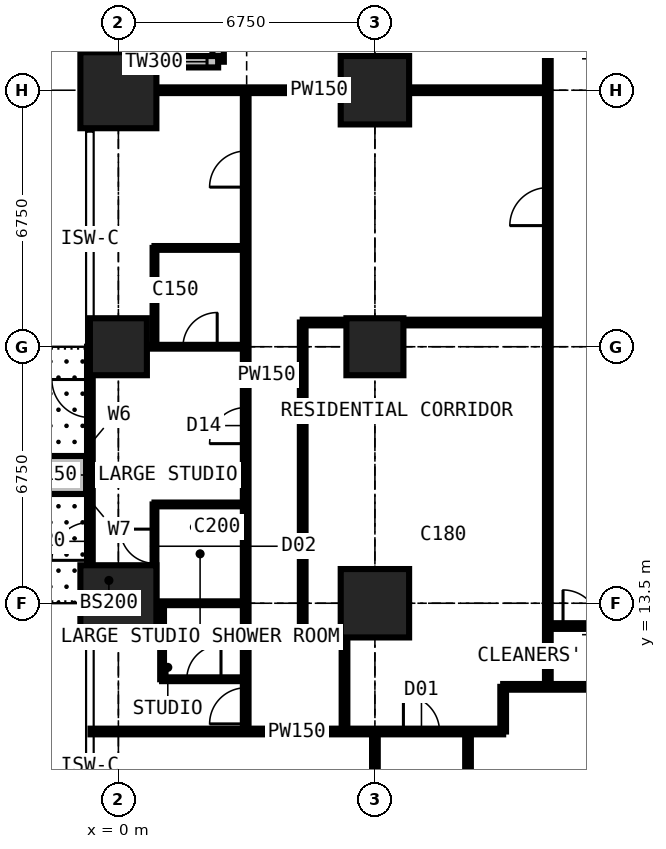
"""IFC4 building model, lengths in metres.
Left out: names, types, materials, properties, quantities, classifications, styles, units other than length and angle.
Written with IfcOpenShell. Run it as: python <this file> out.ifc"""

import sys

from ifc_helpers import new_model, si_unit, direction, frame, frame_2d, origin, origin_2d, place, context, subcontext, project, spatial, rectangle, extrude, element, fill, save


model = new_model("IFC4")
c1 = context("Model", 3, precision=1e-05, world=origin(), true_north=direction((0.0, 1.0)))
c2 = subcontext(c1, "Body", "Model", "MODEL_VIEW")
j1 = project(units=[si_unit("LENGTHUNIT", "METRE"), si_unit("PLANEANGLEUNIT", "RADIAN")], contexts=[c1])
p1 = place(None, origin())
s1 = spatial("IfcSite", under=j1, at=p1, CompositionType="ELEMENT")
p2 = place(p1, origin())
s2 = spatial("IfcBuilding", under=s1, at=p2, CompositionType="ELEMENT")
p3 = place(p2, frame((0.0, 0.0, 142.2)))
s3 = spatial("IfcBuildingStorey", under=s2, at=p3, CompositionType="ELEMENT", Elevation=142.2)
p4 = place(p3, frame((0.0, 13.5, 0.0), z_axis=(0.0, 0.0, 1.0), x_axis=(1.0, 0.0, 0.0)))
e1 = element("IfcColumn", 1, at=p4, inside=s3, PredefinedType="COLUMN", context=c2, shape_type="SweptSolid", body=[
    extrude(rectangle(XDim=2.0, YDim=2.0, at=origin_2d()), origin(), (0.0, 0.0, 1.0), 3.6),
])
p5 = place(p3, frame((0.0, 20.25, 0.0), z_axis=(0.0, 0.0, 1.0), x_axis=(1.0, 0.0, 0.0)))
e2 = element("IfcColumn", 2, at=p5, inside=s3, PredefinedType="COLUMN", context=c2, shape_type="SweptSolid", body=[
    extrude(rectangle(XDim=1.5, YDim=1.5, at=origin_2d()), origin(), (0.0, 0.0, 1.0), 3.6),
])
p6 = place(p3, frame((0.0, 27.0, 0.0), z_axis=(0.0, 0.0, 1.0), x_axis=(1.0, 0.0, 0.0)))
e3 = element("IfcColumn", 3, at=p6, inside=s3, PredefinedType="COLUMN", context=c2, shape_type="SweptSolid", body=[
    extrude(rectangle(XDim=2.0, YDim=2.0, at=origin_2d()), origin(), (0.0, 0.0, 1.0), 3.6),
])
p7 = place(p3, frame((6.75, 13.5, 0.0), z_axis=(0.0, 0.0, 1.0), x_axis=(1.0, 0.0, 0.0)))
e4 = element("IfcColumn", 4, at=p7, inside=s3, PredefinedType="COLUMN", context=c2, shape_type="SweptSolid", body=[
    extrude(rectangle(XDim=1.8, YDim=1.8, at=origin_2d()), origin(), (0.0, 0.0, 1.0), 3.6),
])
p8 = place(p3, frame((6.75, 20.25, 0.0), z_axis=(0.0, 0.0, 1.0), x_axis=(1.0, 0.0, 0.0)))
e5 = element("IfcColumn", 5, at=p8, inside=s3, PredefinedType="COLUMN", context=c2, shape_type="SweptSolid", body=[
    extrude(rectangle(XDim=1.5, YDim=1.5, at=origin_2d()), origin(), (0.0, 0.0, 1.0), 3.6),
])
p9 = place(p3, frame((6.75, 27.0, 0.0), z_axis=(0.0, 0.0, 1.0), x_axis=(1.0, 0.0, 0.0)))
e6 = element("IfcColumn", 6, at=p9, inside=s3, PredefinedType="COLUMN", context=c2, shape_type="SweptSolid", body=[
    extrude(rectangle(XDim=1.8, YDim=1.8, at=origin_2d()), origin(), (0.0, 0.0, 1.0), 3.6),
])
p10 = place(p3, frame((2.625, 31.125, 0.0), z_axis=(0.0, 0.0, 1.0), x_axis=(0.0, -1.0, 0.0)))
e7 = element("IfcWall", 7, at=p10, inside=s3, PredefinedType="SOLIDWALL", context=c2, shape_type="SweptSolid", body=[
    extrude(rectangle(XDim=3.375, YDim=0.3, at=frame_2d((1.688, 0.0))), origin(), (0.0, 0.0, 1.0), 3.375),
])
p11 = place(p10, frame((0.788, 0.0, 0.6)))
e8 = element("IfcOpeningElement", 8, at=p11, cuts=e7, PredefinedType="OPENING", context=c2, shape_type="SweptSolid", body=[
    extrude(rectangle(XDim=1.8, YDim=2.1, at=frame_2d((0.9, 1.05))), frame((0.0, 0.16, 0.0), z_axis=(0.0, -1.0, 0.0), x_axis=(1.0, 0.0, 0.0)), (0.0, 0.0, 1.0), 0.32),
])
p12 = place(p3, frame((2.625, 27.75, 0.0), z_axis=(0.0, 0.0, 1.0), x_axis=(-1.0, 0.0, 0.0)))
e9 = element("IfcWall", 9, at=p12, inside=s3, PredefinedType="SOLIDWALL", context=c2, shape_type="SweptSolid", body=[
    extrude(rectangle(XDim=3.375, YDim=0.3, at=frame_2d((1.688, 0.0))), origin(), (0.0, 0.0, 1.0), 3.375),
])
p13 = place(p12, frame((0.292, 0.0, 0.9)))
e10 = element("IfcOpeningElement", 10, at=p13, cuts=e9, PredefinedType="OPENING", context=c2, shape_type="SweptSolid", body=[
    extrude(rectangle(XDim=1.2, YDim=1.8, at=frame_2d((0.6, 0.9))), frame((0.0, 0.16, 0.0), z_axis=(0.0, -1.0, 0.0), x_axis=(1.0, 0.0, 0.0)), (0.0, 0.0, 1.0), 0.32),
])
p14 = place(p3, frame((-0.75, 13.5, 0.0), z_axis=(0.0, 0.0, 1.0), x_axis=(0.0, 1.0, 0.0)))
e11 = element("IfcWall", 11, at=p14, inside=s3, PredefinedType="SOLIDWALL", context=c2, shape_type="SweptSolid", body=[
    extrude(rectangle(XDim=6.75, YDim=0.15, at=frame_2d((3.375, 0.0))), origin(), (0.0, 0.0, 1.0), 3.375),
])
p15 = place(p14, frame((1.129, 0.0, 0.0)))
e12 = element("IfcOpeningElement", 12, at=p15, cuts=e11, PredefinedType="OPENING", context=c2, shape_type="SweptSolid", body=[
    extrude(rectangle(XDim=1.0, YDim=2.2, at=frame_2d((0.5, 1.1))), frame((0.0, 0.085, 0.0), z_axis=(0.0, -1.0, 0.0), x_axis=(1.0, 0.0, 0.0)), (0.0, 0.0, 1.0), 0.17),
])
p16 = place(p14, frame((2.258, 0.0, 0.9)))
e13 = element("IfcOpeningElement", 13, at=p16, cuts=e11, PredefinedType="OPENING", context=c2, shape_type="SweptSolid", body=[
    extrude(rectangle(XDim=0.9, YDim=1.8, at=frame_2d((0.45, 0.9))), frame((0.0, 0.085, 0.0), z_axis=(0.0, -1.0, 0.0), x_axis=(1.0, 0.0, 0.0)), (0.0, 0.0, 1.0), 0.17),
])
p17 = place(p14, frame((4.887, 0.0, 0.0)))
e14 = element("IfcOpeningElement", 14, at=p17, cuts=e11, PredefinedType="OPENING", context=c2, shape_type="SweptSolid", body=[
    extrude(rectangle(XDim=1.0, YDim=2.2, at=frame_2d((0.5, 1.1))), frame((0.0, 0.085, 0.0), z_axis=(0.0, -1.0, 0.0), x_axis=(1.0, 0.0, 0.0)), (0.0, 0.0, 1.0), 0.17),
])
p18 = place(p14, frame((3.575, 0.0, 0.9)))
e15 = element("IfcOpeningElement", 15, at=p18, cuts=e11, PredefinedType="OPENING", context=c2, shape_type="SweptSolid", body=[
    extrude(rectangle(XDim=1.2, YDim=1.8, at=frame_2d((0.6, 0.9))), frame((0.0, 0.085, 0.0), z_axis=(0.0, -1.0, 0.0), x_axis=(1.0, 0.0, 0.0)), (0.0, 0.0, 1.0), 0.17),
])
p19 = place(p3, frame((-0.85, 16.875, 0.0), z_axis=(0.0, 0.0, 1.0), x_axis=(-1.0, 0.0, 0.0)))
e16 = element("IfcWall", 16, at=p19, inside=s3, PredefinedType="USERDEFINED", context=c2, shape_type="SweptSolid", body=[
    extrude(rectangle(XDim=2.2, YDim=1.0, at=frame_2d((1.1, 0.0))), origin(), (0.0, 0.0, 1.0), 0.9),
])
p20 = place(p3, frame((-0.734, 10.125, 0.0), z_axis=(0.0, 0.0, 1.0), x_axis=(1.0, 0.0, 0.0)))
e17 = element("IfcWall", 17, at=p20, inside=s3, PredefinedType="PARTITIONING", context=c2, shape_type="SweptSolid", body=[
    extrude(rectangle(XDim=10.859, YDim=0.15, at=frame_2d((5.429, 0.0))), origin(), (0.0, 0.0, 1.0), 3.375),
])
p21 = place(p20, frame((8.234, 0.0, 0.0)))
e18 = element("IfcOpeningElement", 18, at=p21, cuts=e17, PredefinedType="OPENING", context=c2, shape_type="SweptSolid", body=[
    extrude(rectangle(XDim=0.95, YDim=2.2, at=frame_2d((0.475, 1.1))), frame((0.0, 0.085, 0.0), z_axis=(0.0, -1.0, 0.0), x_axis=(1.0, 0.0, 0.0)), (0.0, 0.0, 1.0), 0.17),
])
p22 = place(p3, frame((-0.734, 13.5, 0.0), z_axis=(0.0, 0.0, 1.0), x_axis=(1.0, 0.0, 0.0)))
e19 = element("IfcWall", 19, at=p22, inside=s3, PredefinedType="PARTITIONING", context=c2, shape_type="SweptSolid", body=[
    extrude(rectangle(XDim=4.084, YDim=0.1, at=frame_2d((2.042, 0.0))), origin(), (0.0, 0.0, 1.0), 2.877),
])
p23 = place(p3, frame((-0.734, 20.25, 0.0), z_axis=(0.0, 0.0, 1.0), x_axis=(1.0, 0.0, 0.0)))
e20 = element("IfcWall", 20, at=p23, inside=s3, PredefinedType="PARTITIONING", context=c2, shape_type="SweptSolid", body=[
    extrude(rectangle(XDim=4.084, YDim=0.1, at=frame_2d((2.042, 0.0))), origin(), (0.0, 0.0, 1.0), 2.877),
])
p24 = place(p23, frame((2.434, 0.0, 0.0)))
e21 = element("IfcOpeningElement", 21, at=p24, cuts=e20, PredefinedType="OPENING", context=c2, shape_type="SweptSolid", body=[
    extrude(rectangle(XDim=0.9, YDim=2.2, at=frame_2d((0.45, 1.1))), frame((0.0, 0.06, 0.0), z_axis=(0.0, -1.0, 0.0), x_axis=(1.0, 0.0, 0.0)), (0.0, 0.0, 1.0), 0.12),
])
p25 = place(p3, frame((-0.734, 27.0, 0.0), z_axis=(0.0, 0.0, 1.0), x_axis=(1.0, 0.0, 0.0)))
e22 = element("IfcWall", 22, at=p25, inside=s3, PredefinedType="PARTITIONING", context=c2, shape_type="SweptSolid", body=[
    extrude(rectangle(XDim=12.034, YDim=0.15, at=frame_2d((6.017, 0.0))), origin(), (0.0, 0.0, 1.0), 2.806),
])
p26 = place(p3, frame((0.95, 13.5, 0.0), z_axis=(0.0, 0.0, 1.0), x_axis=(0.0, 1.0, 0.0)))
e23 = element("IfcWall", 23, at=p26, inside=s3, PredefinedType="PARTITIONING", context=c2, shape_type="SweptSolid", body=[
    extrude(rectangle(XDim=2.6, YDim=0.1, at=frame_2d((1.3, 0.0))), origin(), (0.0, 0.0, 1.0), 3.375),
])
p27 = place(p26, frame((1.05, 0.0, 0.0)))
e24 = element("IfcOpeningElement", 24, at=p27, cuts=e23, PredefinedType="OPENING", context=c2, shape_type="SweptSolid", body=[
    extrude(rectangle(XDim=0.9, YDim=2.2, at=frame_2d((0.45, 1.1))), frame((0.0, 0.06, 0.0), z_axis=(0.0, -1.0, 0.0), x_axis=(1.0, 0.0, 0.0)), (0.0, 0.0, 1.0), 0.12),
])
p28 = place(p3, frame((0.95, 16.1, 0.0), z_axis=(0.0, 0.0, 1.0), x_axis=(1.0, 0.0, 0.0)))
e25 = element("IfcWall", 25, at=p28, inside=s3, PredefinedType="PARTITIONING", context=c2, shape_type="SweptSolid", body=[
    extrude(rectangle(XDim=2.4, YDim=0.1, at=frame_2d((1.2, 0.0))), origin(), (0.0, 0.0, 1.0), 3.375),
])
p29 = place(p3, frame((0.95, 20.25, 0.0), z_axis=(0.0, 0.0, 1.0), x_axis=(0.0, 1.0, 0.0)))
e26 = element("IfcWall", 26, at=p29, inside=s3, PredefinedType="PARTITIONING", context=c2, shape_type="SweptSolid", body=[
    extrude(rectangle(XDim=2.6, YDim=0.1, at=frame_2d((1.3, 0.0))), origin(), (0.0, 0.0, 1.0), 3.375),
])
p30 = place(p3, frame((0.95, 22.85, 0.0), z_axis=(0.0, 0.0, 1.0), x_axis=(1.0, 0.0, 0.0)))
e27 = element("IfcWall", 27, at=p30, inside=s3, PredefinedType="PARTITIONING", context=c2, shape_type="SweptSolid", body=[
    extrude(rectangle(XDim=2.4, YDim=0.1, at=frame_2d((1.2, 0.0))), origin(), (0.0, 0.0, 1.0), 3.375),
])
p31 = place(p3, frame((1.15, 11.5, 0.0), z_axis=(0.0, 0.0, 1.0), x_axis=(0.0, 1.0, 0.0)))
e28 = element("IfcWall", 28, at=p31, inside=s3, PredefinedType="PARTITIONING", context=c2, shape_type="SweptSolid", body=[
    extrude(rectangle(XDim=2.0, YDim=0.1, at=frame_2d((1.0, 0.0))), origin(), (0.0, 0.0, 1.0), 3.375),
])
p32 = place(p3, frame((1.15, 11.5, 0.0), z_axis=(0.0, 0.0, 1.0), x_axis=(1.0, 0.0, 0.0)))
e29 = element("IfcWall", 29, at=p32, inside=s3, PredefinedType="PARTITIONING", context=c2, shape_type="SweptSolid", body=[
    extrude(rectangle(XDim=2.2, YDim=0.1, at=frame_2d((1.1, 0.0))), origin(), (0.0, 0.0, 1.0), 3.375),
])
p33 = place(p32, frame((0.65, 0.0, 0.0)))
e30 = element("IfcOpeningElement", 30, at=p33, cuts=e29, PredefinedType="OPENING", context=c2, shape_type="SweptSolid", body=[
    extrude(rectangle(XDim=0.9, YDim=2.2, at=frame_2d((0.45, 1.1))), frame((0.0, 0.06, 0.0), z_axis=(0.0, -1.0, 0.0), x_axis=(1.0, 0.0, 0.0)), (0.0, 0.0, 1.0), 0.12),
])
p34 = place(p3, frame((3.35, 10.125, 0.0), z_axis=(0.0, 0.0, 1.0), x_axis=(0.0, 1.0, 0.0)))
e31 = element("IfcWall", 31, at=p34, inside=s3, PredefinedType="PARTITIONING", context=c2, shape_type="SweptSolid", body=[
    extrude(rectangle(XDim=16.875, YDim=0.15, at=frame_2d((8.438, 0.0))), origin(), (0.0, 0.0, 1.0), 3.375),
])
p35 = place(p34, frame((7.575, 0.0, 0.0)))
e32 = element("IfcOpeningElement", 32, at=p35, cuts=e31, PredefinedType="OPENING", context=c2, shape_type="SweptSolid", body=[
    extrude(rectangle(XDim=0.95, YDim=2.2, at=frame_2d((0.475, 1.1))), frame((0.0, 0.085, 0.0), z_axis=(0.0, -1.0, 0.0), x_axis=(1.0, 0.0, 0.0)), (0.0, 0.0, 1.0), 0.17),
])
p36 = place(p34, frame((14.325, 0.0, 0.0)))
e33 = element("IfcOpeningElement", 33, at=p36, cuts=e31, PredefinedType="OPENING", context=c2, shape_type="SweptSolid", body=[
    extrude(rectangle(XDim=0.95, YDim=2.2, at=frame_2d((0.475, 1.1))), frame((0.0, 0.085, 0.0), z_axis=(0.0, -1.0, 0.0), x_axis=(1.0, 0.0, 0.0)), (0.0, 0.0, 1.0), 0.17),
])
p37 = place(p34, frame((0.2, 0.0, 0.0)))
e34 = element("IfcOpeningElement", 34, at=p37, cuts=e31, PredefinedType="OPENING", context=c2, shape_type="SweptSolid", body=[
    extrude(rectangle(XDim=0.95, YDim=2.2, at=frame_2d((0.475, 1.1))), frame((0.0, 0.085, 0.0), z_axis=(0.0, -1.0, 0.0), x_axis=(1.0, 0.0, 0.0)), (0.0, 0.0, 1.0), 0.17),
])
p38 = place(p3, frame((4.85, 12.775, 0.0), z_axis=(0.0, 0.0, 1.0), x_axis=(0.0, 1.0, 0.0)))
e35 = element("IfcWall", 35, at=p38, inside=s3, PredefinedType="PARTITIONING", context=c2, shape_type="SweptSolid", body=[
    extrude(rectangle(XDim=8.113, YDim=0.15, at=frame_2d((4.056, 0.0))), origin(), (0.0, 0.0, 1.0), 3.375),
])
p39 = place(p3, frame((4.85, 12.775, 0.0), z_axis=(0.0, 0.0, 1.0), x_axis=(1.0, 0.0, 0.0)))
e36 = element("IfcWall", 36, at=p39, inside=s3, PredefinedType="PARTITIONING", context=c2, shape_type="SweptSolid", body=[
    extrude(rectangle(XDim=1.1, YDim=0.15, at=frame_2d((0.55, 0.0))), origin(), (0.0, 0.0, 1.0), 3.375),
])
p40 = place(p3, frame((4.85, 20.887, 0.0), z_axis=(0.0, 0.0, 1.0), x_axis=(1.0, 0.0, 0.0)))
e37 = element("IfcWall", 37, at=p40, inside=s3, PredefinedType="PARTITIONING", context=c2, shape_type="SweptSolid", body=[
    extrude(rectangle(XDim=6.45, YDim=0.15, at=frame_2d((3.225, 0.0))), origin(), (0.0, 0.0, 1.0), 3.375),
])
p41 = place(p3, frame((5.95, 10.125, 0.0), z_axis=(0.0, 0.0, 1.0), x_axis=(0.0, 1.0, 0.0)))
e38 = element("IfcWall", 38, at=p41, inside=s3, PredefinedType="PARTITIONING", context=c2, shape_type="SweptSolid", body=[
    extrude(rectangle(XDim=2.65, YDim=0.15, at=frame_2d((1.325, 0.0))), origin(), (0.0, 0.0, 1.0), 3.375),
])
p42 = place(p3, frame((6.75, -0.734, 0.0), z_axis=(0.0, 0.0, 1.0), x_axis=(0.0, 1.0, 0.0)))
e39 = element("IfcWall", 39, at=p42, inside=s3, PredefinedType="PARTITIONING", context=c2, shape_type="SweptSolid", body=[
    extrude(rectangle(XDim=10.859, YDim=0.15, at=frame_2d((5.429, 0.0))), origin(), (0.0, 0.0, 1.0), 2.877),
])
p43 = place(p42, frame((5.684, 0.0, 0.0)))
e40 = element("IfcOpeningElement", 40, at=p43, cuts=e39, PredefinedType="OPENING", context=c2, shape_type="SweptSolid", body=[
    extrude(rectangle(XDim=1.0, YDim=2.2, at=frame_2d((0.5, 1.1))), frame((0.0, 0.085, 0.0), z_axis=(0.0, -1.0, 0.0), x_axis=(1.0, 0.0, 0.0)), (0.0, 0.0, 1.0), 0.17),
])
p44 = place(p3, frame((9.2, 4.85, 0.0), z_axis=(0.0, 0.0, 1.0), x_axis=(0.0, 1.0, 0.0)))
e41 = element("IfcWall", 41, at=p44, inside=s3, PredefinedType="PARTITIONING", context=c2, shape_type="SweptSolid", body=[
    extrude(rectangle(XDim=5.275, YDim=0.15, at=frame_2d((2.637, 0.0))), origin(), (0.0, 0.0, 1.0), 3.375),
])
p45 = place(p3, frame((10.125, 10.125, 0.0), z_axis=(0.0, 0.0, 1.0), x_axis=(0.0, 1.0, 0.0)))
e42 = element("IfcWall", 42, at=p45, inside=s3, PredefinedType="PARTITIONING", context=c2, shape_type="SweptSolid", body=[
    extrude(rectangle(XDim=1.175, YDim=0.15, at=frame_2d((0.587, 0.0))), origin(), (0.0, 0.0, 1.0), 3.375),
])
p46 = place(p3, frame((10.125, 11.3, 0.0), z_axis=(0.0, 0.0, 1.0), x_axis=(1.0, 0.0, 0.0)))
e43 = element("IfcWall", 43, at=p46, inside=s3, PredefinedType="PARTITIONING", context=c2, shape_type="SweptSolid", body=[
    extrude(rectangle(XDim=20.25, YDim=0.15, at=frame_2d((10.125, 0.0))), origin(), (0.0, 0.0, 1.0), 3.375),
])
p47 = place(p46, frame((11.312, 0.0, 0.0)))
e44 = element("IfcOpeningElement", 44, at=p47, cuts=e43, PredefinedType="OPENING", context=c2, shape_type="SweptSolid", body=[
    extrude(rectangle(XDim=1.0, YDim=2.2, at=frame_2d((0.5, 1.1))), frame((0.0, 0.085, 0.0), z_axis=(0.0, -1.0, 0.0), x_axis=(1.0, 0.0, 0.0)), (0.0, 0.0, 1.0), 0.17),
])
p48 = place(p3, frame((11.3, 11.3, 0.0), z_axis=(0.0, 0.0, 1.0), x_axis=(0.0, 1.0, 0.0)))
e45 = element("IfcWall", 45, at=p48, inside=s3, PredefinedType="PARTITIONING", context=c2, shape_type="SweptSolid", body=[
    extrude(rectangle(XDim=19.3, YDim=0.15, at=frame_2d((9.65, 0.0))), origin(), (0.0, 0.0, 1.0), 3.375),
])
p49 = place(p48, frame((18.1, 0.0, 0.0)))
e46 = element("IfcOpeningElement", 46, at=p49, cuts=e45, PredefinedType="OPENING", context=c2, shape_type="SweptSolid", body=[
    extrude(rectangle(XDim=1.0, YDim=2.2, at=frame_2d((0.5, 1.1))), frame((0.0, 0.085, 0.0), z_axis=(0.0, -1.0, 0.0), x_axis=(1.0, 0.0, 0.0)), (0.0, 0.0, 1.0), 0.17),
])
p50 = place(p48, frame((12.137, 0.0, 0.0)))
e47 = element("IfcOpeningElement", 47, at=p50, cuts=e45, PredefinedType="OPENING", context=c2, shape_type="SweptSolid", body=[
    extrude(rectangle(XDim=1.0, YDim=2.2, at=frame_2d((0.5, 1.1))), frame((0.0, 0.085, 0.0), z_axis=(0.0, -1.0, 0.0), x_axis=(1.0, 0.0, 0.0)), (0.0, 0.0, 1.0), 0.17),
])
p51 = place(p3, frame((11.3, 12.9, 0.0), z_axis=(0.0, 0.0, 1.0), x_axis=(1.0, 0.0, 0.0)))
e48 = element("IfcWall", 48, at=p51, inside=s3, PredefinedType="PARTITIONING", context=c2, shape_type="SweptSolid", body=[
    extrude(rectangle(XDim=1.8, YDim=0.15, at=frame_2d((0.9, 0.0))), origin(), (0.0, 0.0, 1.0), 2.806),
])
p52 = place(p51, frame((0.4, 0.0, 0.0)))
e49 = element("IfcOpeningElement", 49, at=p52, cuts=e48, PredefinedType="OPENING", context=c2, shape_type="SweptSolid", body=[
    extrude(rectangle(XDim=0.95, YDim=2.2, at=frame_2d((0.475, 1.1))), frame((0.0, 0.085, 0.0), z_axis=(0.0, -1.0, 0.0), x_axis=(1.0, 0.0, 0.0)), (0.0, 0.0, 1.0), 0.17),
])
p53 = place(p13, origin())
e50 = element("IfcWindow", 50, at=p53, inside=s3, PartitioningType="SINGLE_PANEL", PredefinedType="WINDOW", context=c2, shape_type="SweptSolid", body=[
    extrude(rectangle(XDim=1.2, YDim=1.8, at=frame_2d((0.6, 0.9))), frame((0.0, 0.03, 0.0), z_axis=(0.0, -1.0, 0.0), x_axis=(1.0, 0.0, 0.0)), (0.0, 0.0, 1.0), 0.06),
])
fill(e10, e50)
p54 = place(p15, origin())
e51 = element("IfcDoor", 51, at=p54, inside=s3, OperationType="SINGLE_SWING_LEFT", PredefinedType="DOOR", context=c2, shape_type="SweptSolid", body=[
    extrude(rectangle(XDim=1.0, YDim=2.2, at=frame_2d((0.5, 1.1))), frame((0.0, 0.025, 0.0), z_axis=(0.0, -1.0, 0.0), x_axis=(1.0, 0.0, 0.0)), (0.0, 0.0, 1.0), 0.05),
])
fill(e12, e51)
p55 = place(p16, origin())
e52 = element("IfcWindow", 52, at=p55, inside=s3, PartitioningType="SINGLE_PANEL", PredefinedType="WINDOW", context=c2, shape_type="SweptSolid", body=[
    extrude(rectangle(XDim=0.9, YDim=1.8, at=frame_2d((0.45, 0.9))), frame((0.0, 0.03, 0.0), z_axis=(0.0, -1.0, 0.0), x_axis=(1.0, 0.0, 0.0)), (0.0, 0.0, 1.0), 0.06),
])
fill(e13, e52)
p56 = place(p17, origin())
e53 = element("IfcDoor", 53, at=p56, inside=s3, OperationType="SINGLE_SWING_RIGHT", PredefinedType="DOOR", context=c2, shape_type="SweptSolid", body=[
    extrude(rectangle(XDim=1.0, YDim=2.2, at=frame_2d((0.5, 1.1))), frame((0.0, 0.025, 0.0), z_axis=(0.0, -1.0, 0.0), x_axis=(1.0, 0.0, 0.0)), (0.0, 0.0, 1.0), 0.05),
])
fill(e14, e53)
p57 = place(p18, origin())
e54 = element("IfcWindow", 54, at=p57, inside=s3, PartitioningType="SINGLE_PANEL", PredefinedType="WINDOW", context=c2, shape_type="SweptSolid", body=[
    extrude(rectangle(XDim=1.2, YDim=1.8, at=frame_2d((0.6, 0.9))), frame((0.0, 0.03, 0.0), z_axis=(0.0, -1.0, 0.0), x_axis=(1.0, 0.0, 0.0)), (0.0, 0.0, 1.0), 0.06),
])
fill(e15, e54)
p58 = place(p52, origin())
e55 = element("IfcDoor", 55, at=p58, inside=s3, OperationType="SINGLE_SWING_LEFT", PredefinedType="DOOR", context=c2, shape_type="SweptSolid", body=[
    extrude(rectangle(XDim=0.95, YDim=2.2, at=frame_2d((0.475, 1.1))), frame((0.0, 0.025, 0.0), z_axis=(0.0, -1.0, 0.0), x_axis=(1.0, 0.0, 0.0)), (0.0, 0.0, 1.0), 0.05),
])
fill(e49, e55)
p59 = place(p35, origin())
e56 = element("IfcDoor", 56, at=p59, inside=s3, OperationType="SINGLE_SWING_LEFT", PredefinedType="DOOR", context=c2, shape_type="SweptSolid", body=[
    extrude(rectangle(XDim=0.95, YDim=2.2, at=frame_2d((0.475, 1.1))), frame((0.0, 0.025, 0.0), z_axis=(0.0, -1.0, 0.0), x_axis=(1.0, 0.0, 0.0)), (0.0, 0.0, 1.0), 0.05),
])
fill(e32, e56)
p60 = place(p27, origin())
e57 = element("IfcDoor", 57, at=p60, inside=s3, OperationType="SINGLE_SWING_RIGHT", PredefinedType="DOOR", context=c2, shape_type="SweptSolid", body=[
    extrude(rectangle(XDim=0.9, YDim=2.2, at=frame_2d((0.45, 1.1))), frame((0.0, 0.025, 0.0), z_axis=(0.0, -1.0, 0.0), x_axis=(1.0, 0.0, 0.0)), (0.0, 0.0, 1.0), 0.05),
])
fill(e24, e57)
p61 = place(p36, origin())
e58 = element("IfcDoor", 58, at=p61, inside=s3, OperationType="SINGLE_SWING_LEFT", PredefinedType="DOOR", context=c2, shape_type="SweptSolid", body=[
    extrude(rectangle(XDim=0.95, YDim=2.2, at=frame_2d((0.475, 1.1))), frame((0.0, 0.025, 0.0), z_axis=(0.0, -1.0, 0.0), x_axis=(1.0, 0.0, 0.0)), (0.0, 0.0, 1.0), 0.05),
])
fill(e33, e58)
p62 = place(p24, origin())
e59 = element("IfcDoor", 59, at=p62, inside=s3, OperationType="SINGLE_SWING_RIGHT", PredefinedType="DOOR", context=c2, shape_type="SweptSolid", body=[
    extrude(rectangle(XDim=0.9, YDim=2.2, at=frame_2d((0.45, 1.1))), frame((0.0, 0.025, 0.0), z_axis=(0.0, -1.0, 0.0), x_axis=(1.0, 0.0, 0.0)), (0.0, 0.0, 1.0), 0.05),
])
fill(e21, e59)
p63 = place(p37, origin())
e60 = element("IfcDoor", 60, at=p63, inside=s3, OperationType="SINGLE_SWING_LEFT", PredefinedType="DOOR", context=c2, shape_type="SweptSolid", body=[
    extrude(rectangle(XDim=0.95, YDim=2.2, at=frame_2d((0.475, 1.1))), frame((0.0, 0.025, 0.0), z_axis=(0.0, -1.0, 0.0), x_axis=(1.0, 0.0, 0.0)), (0.0, 0.0, 1.0), 0.05),
])
fill(e34, e60)
p64 = place(p33, origin())
e61 = element("IfcDoor", 61, at=p64, inside=s3, OperationType="SINGLE_SWING_RIGHT", PredefinedType="DOOR", context=c2, shape_type="SweptSolid", body=[
    extrude(rectangle(XDim=0.9, YDim=2.2, at=frame_2d((0.45, 1.1))), frame((0.0, 0.025, 0.0), z_axis=(0.0, -1.0, 0.0), x_axis=(1.0, 0.0, 0.0)), (0.0, 0.0, 1.0), 0.05),
])
fill(e30, e61)
p65 = place(p50, origin())
e62 = element("IfcDoor", 62, at=p65, inside=s3, OperationType="SINGLE_SWING_LEFT", PredefinedType="DOOR", context=c2, shape_type="SweptSolid", body=[
    extrude(rectangle(XDim=1.0, YDim=2.2, at=frame_2d((0.5, 1.1))), frame((0.0, 0.025, 0.0), z_axis=(0.0, -1.0, 0.0), x_axis=(1.0, 0.0, 0.0)), (0.0, 0.0, 1.0), 0.05),
])
fill(e47, e62)
p66 = place(p21, origin())
e63 = element("IfcDoor", 63, at=p66, inside=s3, OperationType="SINGLE_SWING_LEFT", PredefinedType="DOOR", context=c2, shape_type="SweptSolid", body=[
    extrude(rectangle(XDim=0.95, YDim=2.2, at=frame_2d((0.475, 1.1))), frame((0.0, 0.025, 0.0), z_axis=(0.0, -1.0, 0.0), x_axis=(1.0, 0.0, 0.0)), (0.0, 0.0, 1.0), 0.05),
])
fill(e18, e63)
save(model, sys.argv[1])
